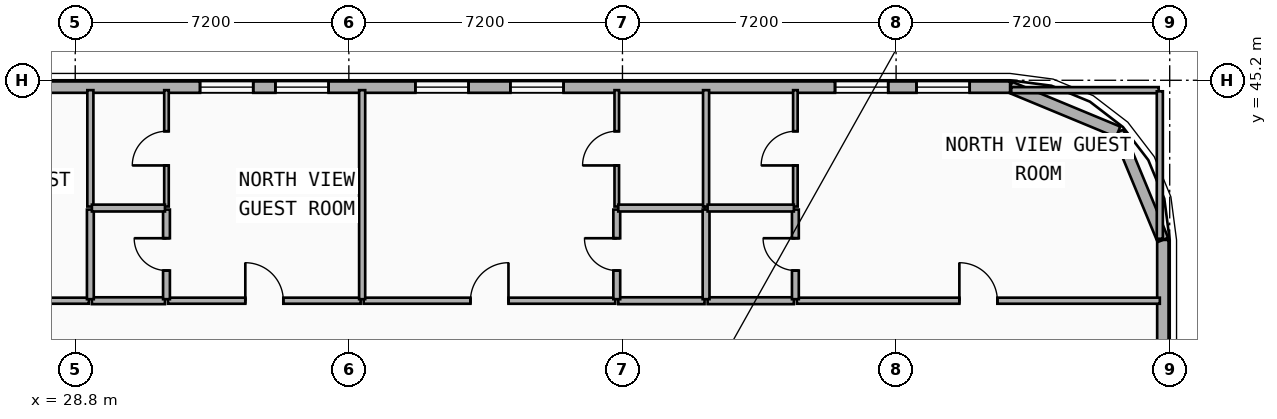
"""IFC4 building model, lengths in metres.
Left out: names, types, materials, properties, quantities, classifications, styles, units other than length and angle.
Written with IfcOpenShell. Run it as: python <this file> out.ifc"""

import sys

from ifc_helpers import new_model, si_unit, direction, frame, frame_2d, origin, place, context, subcontext, project, spatial, rectangle, extrude, element, fill, save


model = new_model("IFC4")
c1 = context("Model", 3, precision=1e-05, world=origin(), true_north=direction((0.0, 1.0)))
c2 = subcontext(c1, "Body", "Model", "MODEL_VIEW")
j1 = project(units=[si_unit("LENGTHUNIT", "METRE"), si_unit("PLANEANGLEUNIT", "RADIAN")], contexts=[c1])
p1 = place(None, origin())
s1 = spatial("IfcSite", under=j1, at=p1, CompositionType="ELEMENT")
p2 = place(p1, origin())
s2 = spatial("IfcBuilding", under=s1, at=p2, CompositionType="ELEMENT")
p3 = place(p2, frame((0.0, 0.0, 36.0)))
s3 = spatial("IfcBuildingStorey", under=s2, at=p3, CompositionType="ELEMENT", Elevation=36.0)
p4 = place(p3, frame((57.42, 41.0, 0.0), z_axis=(0.0, 0.0, 1.0), x_axis=(0.0, -1.0, 0.0)))
e1 = element("IfcWall", 1, at=p4, inside=s3, PredefinedType="SOLIDWALL", context=c2, shape_type="SweptSolid", body=[
    extrude(rectangle(XDim=15.2, YDim=0.3, at=frame_2d((7.6, 0.0))), origin(), (0.0, 0.0, 1.0), 3.24),
])
p5 = place(p4, frame((10.882, 0.0, 0.48)))
e2 = element("IfcOpeningElement", 2, at=p5, cuts=e1, PredefinedType="OPENING", context=c2, shape_type="SweptSolid", body=[
    extrude(rectangle(XDim=1.4, YDim=1.8, at=frame_2d((0.7, 0.9))), frame((0.0, 0.16, 0.0), z_axis=(0.0, -1.0, 0.0), x_axis=(1.0, 0.0, 0.0)), (0.0, 0.0, 1.0), 0.32),
])
p6 = place(p4, frame((5.621, 0.0, 0.48)))
e3 = element("IfcOpeningElement", 3, at=p6, cuts=e1, PredefinedType="OPENING", context=c2, shape_type="SweptSolid", body=[
    extrude(rectangle(XDim=1.4, YDim=1.8, at=frame_2d((0.7, 0.9))), frame((0.0, 0.16, 0.0), z_axis=(0.0, -1.0, 0.0), x_axis=(1.0, 0.0, 0.0)), (0.0, 0.0, 1.0), 0.32),
])
p7 = place(p3, frame((56.243, 43.843, 0.0), z_axis=(0.0, 0.0, 1.0), x_axis=(0.382636798336, -0.92389884758, 0.0)))
e4 = element("IfcWall", 4, at=p7, inside=s3, PredefinedType="SOLIDWALL", context=c2, shape_type="SweptSolid", body=[
    extrude(rectangle(XDim=3.077, YDim=0.3, at=frame_2d((1.538, 0.0))), origin(), (0.0, 0.0, 1.0), 3.24),
])
p8 = place(p3, frame((53.4, 45.02, 0.0), z_axis=(0.0, 0.0, 1.0), x_axis=(0.923882414032, -0.382676475685, 0.0)))
e5 = element("IfcWall", 5, at=p8, inside=s3, PredefinedType="SOLIDWALL", context=c2, shape_type="SweptSolid", body=[
    extrude(rectangle(XDim=3.077, YDim=0.3, at=frame_2d((1.539, 0.0))), origin(), (0.0, 0.0, 1.0), 3.24),
])
p9 = place(p3, frame((4.2, 45.02, 0.0), z_axis=(0.0, 0.0, 1.0), x_axis=(1.0, 0.0, 0.0)))
e6 = element("IfcWall", 6, at=p9, inside=s3, PredefinedType="SOLIDWALL", context=c2, shape_type="SweptSolid", body=[
    extrude(rectangle(XDim=49.2, YDim=0.3, at=frame_2d((24.6, 0.0))), origin(), (0.0, 0.0, 1.0), 3.24),
])
p10 = place(p9, frame((5.87, 0.0, 0.85)))
e7 = element("IfcOpeningElement", 7, at=p10, cuts=e6, PredefinedType="OPENING", context=c2, shape_type="SweptSolid", body=[
    extrude(rectangle(XDim=1.4, YDim=1.8, at=frame_2d((0.7, 0.9))), frame((0.0, 0.16, 0.0), z_axis=(0.0, -1.0, 0.0), x_axis=(1.0, 0.0, 0.0)), (0.0, 0.0, 1.0), 0.32),
])
p11 = place(p9, frame((8.481, 0.0, 0.85)))
e8 = element("IfcOpeningElement", 8, at=p11, cuts=e6, PredefinedType="OPENING", context=c2, shape_type="SweptSolid", body=[
    extrude(rectangle(XDim=1.4, YDim=1.8, at=frame_2d((0.7, 0.9))), frame((0.0, 0.16, 0.0), z_axis=(0.0, -1.0, 0.0), x_axis=(1.0, 0.0, 0.0)), (0.0, 0.0, 1.0), 0.32),
])
p12 = place(p9, frame((18.227, 0.0, 0.85)))
e9 = element("IfcOpeningElement", 9, at=p12, cuts=e6, PredefinedType="OPENING", context=c2, shape_type="SweptSolid", body=[
    extrude(rectangle(XDim=1.4, YDim=1.8, at=frame_2d((0.7, 0.9))), frame((0.0, 0.16, 0.0), z_axis=(0.0, -1.0, 0.0), x_axis=(1.0, 0.0, 0.0)), (0.0, 0.0, 1.0), 0.32),
])
p13 = place(p9, frame((21.462, 0.0, 0.85)))
e10 = element("IfcOpeningElement", 10, at=p13, cuts=e6, PredefinedType="OPENING", context=c2, shape_type="SweptSolid", body=[
    extrude(rectangle(XDim=1.4, YDim=1.8, at=frame_2d((0.7, 0.9))), frame((0.0, 0.16, 0.0), z_axis=(0.0, -1.0, 0.0), x_axis=(1.0, 0.0, 0.0)), (0.0, 0.0, 1.0), 0.32),
])
p14 = place(p9, frame((27.884, 0.0, 0.85)))
e11 = element("IfcOpeningElement", 11, at=p14, cuts=e6, PredefinedType="OPENING", context=c2, shape_type="SweptSolid", body=[
    extrude(rectangle(XDim=1.4, YDim=1.8, at=frame_2d((0.7, 0.9))), frame((0.0, 0.16, 0.0), z_axis=(0.0, -1.0, 0.0), x_axis=(1.0, 0.0, 0.0)), (0.0, 0.0, 1.0), 0.32),
])
p15 = place(p9, frame((29.867, 0.0, 0.85)))
e12 = element("IfcOpeningElement", 12, at=p15, cuts=e6, PredefinedType="OPENING", context=c2, shape_type="SweptSolid", body=[
    extrude(rectangle(XDim=1.4, YDim=1.8, at=frame_2d((0.7, 0.9))), frame((0.0, 0.16, 0.0), z_axis=(0.0, -1.0, 0.0), x_axis=(1.0, 0.0, 0.0)), (0.0, 0.0, 1.0), 0.32),
])
p16 = place(p9, frame((33.55, 0.0, 0.85)))
e13 = element("IfcOpeningElement", 13, at=p16, cuts=e6, PredefinedType="OPENING", context=c2, shape_type="SweptSolid", body=[
    extrude(rectangle(XDim=1.4, YDim=1.8, at=frame_2d((0.7, 0.9))), frame((0.0, 0.16, 0.0), z_axis=(0.0, -1.0, 0.0), x_axis=(1.0, 0.0, 0.0)), (0.0, 0.0, 1.0), 0.32),
])
p17 = place(p9, frame((36.05, 0.0, 0.85)))
e14 = element("IfcOpeningElement", 14, at=p17, cuts=e6, PredefinedType="OPENING", context=c2, shape_type="SweptSolid", body=[
    extrude(rectangle(XDim=1.4, YDim=1.8, at=frame_2d((0.7, 0.9))), frame((0.0, 0.16, 0.0), z_axis=(0.0, -1.0, 0.0), x_axis=(1.0, 0.0, 0.0)), (0.0, 0.0, 1.0), 0.32),
])
p18 = place(p9, frame((44.593, 0.0, 0.85)))
e15 = element("IfcOpeningElement", 15, at=p18, cuts=e6, PredefinedType="OPENING", context=c2, shape_type="SweptSolid", body=[
    extrude(rectangle(XDim=1.4, YDim=1.8, at=frame_2d((0.7, 0.9))), frame((0.0, 0.16, 0.0), z_axis=(0.0, -1.0, 0.0), x_axis=(1.0, 0.0, 0.0)), (0.0, 0.0, 1.0), 0.32),
])
p19 = place(p9, frame((46.737, 0.0, 0.85)))
e16 = element("IfcOpeningElement", 16, at=p19, cuts=e6, PredefinedType="OPENING", context=c2, shape_type="SweptSolid", body=[
    extrude(rectangle(XDim=1.4, YDim=1.8, at=frame_2d((0.7, 0.9))), frame((0.0, 0.16, 0.0), z_axis=(0.0, -1.0, 0.0), x_axis=(1.0, 0.0, 0.0)), (0.0, 0.0, 1.0), 0.32),
])
p20 = place(p3, frame((20.331, 39.4, 0.0), z_axis=(0.0, 0.0, 1.0), x_axis=(1.0, 0.0, 0.0)))
e17 = element("IfcWall", 17, at=p20, inside=s3, PredefinedType="PARTITIONING", context=c2, shape_type="SweptSolid", body=[
    extrude(rectangle(XDim=8.827, YDim=0.16, at=frame_2d((4.414, 0.0))), origin(), (0.0, 0.0, 1.0), 3.24),
])
p21 = place(p20, frame((3.914, 0.0, 0.0)))
e18 = element("IfcOpeningElement", 18, at=p21, cuts=e17, PredefinedType="OPENING", context=c2, shape_type="SweptSolid", body=[
    extrude(rectangle(XDim=1.0, YDim=2.15, at=frame_2d((0.5, 1.075))), frame((0.0, 0.09, 0.0), z_axis=(0.0, -1.0, 0.0), x_axis=(1.0, 0.0, 0.0)), (0.0, 0.0, 1.0), 0.18),
])
p22 = place(p3, frame((31.241, 39.4, 0.0), z_axis=(0.0, 0.0, 1.0), x_axis=(1.0, 0.0, 0.0)))
e19 = element("IfcWall", 19, at=p22, inside=s3, PredefinedType="PARTITIONING", context=c2, shape_type="SweptSolid", body=[
    extrude(rectangle(XDim=5.069, YDim=0.16, at=frame_2d((2.535, 0.0))), origin(), (0.0, 0.0, 1.0), 3.24),
])
p23 = place(p22, frame((2.034, 0.0, 0.0)))
e20 = element("IfcOpeningElement", 20, at=p23, cuts=e19, PredefinedType="OPENING", context=c2, shape_type="SweptSolid", body=[
    extrude(rectangle(XDim=1.0, YDim=2.15, at=frame_2d((0.5, 1.075))), frame((0.0, 0.09, 0.0), z_axis=(0.0, -1.0, 0.0), x_axis=(1.0, 0.0, 0.0)), (0.0, 0.0, 1.0), 0.18),
])
p24 = place(p3, frame((29.238, 39.4, 0.0), z_axis=(0.0, 0.0, 1.0), x_axis=(1.0, 0.0, 0.0)))
e21 = element("IfcWall", 21, at=p24, inside=s3, PredefinedType="PLUMBINGWALL", context=c2, shape_type="SweptSolid", body=[
    extrude(rectangle(XDim=1.923, YDim=0.18, at=frame_2d((0.961, 0.0))), origin(), (0.0, 0.0, 1.0), 3.24),
])
p25 = place(p3, frame((36.39, 39.4, 0.0), z_axis=(0.0, 0.0, 1.0), x_axis=(1.0, 0.0, 0.0)))
e22 = element("IfcWall", 22, at=p25, inside=s3, PredefinedType="PARTITIONING", context=c2, shape_type="SweptSolid", body=[
    extrude(rectangle(XDim=6.62, YDim=0.16, at=frame_2d((3.31, 0.0))), origin(), (0.0, 0.0, 1.0), 3.24),
])
p26 = place(p25, frame((2.81, 0.0, 0.0)))
e23 = element("IfcOpeningElement", 23, at=p26, cuts=e22, PredefinedType="OPENING", context=c2, shape_type="SweptSolid", body=[
    extrude(rectangle(XDim=1.0, YDim=2.15, at=frame_2d((0.5, 1.075))), frame((0.0, 0.09, 0.0), z_axis=(0.0, -1.0, 0.0), x_axis=(1.0, 0.0, 0.0)), (0.0, 0.0, 1.0), 0.18),
])
p27 = place(p3, frame((43.09, 39.4, 0.0), z_axis=(0.0, 0.0, 1.0), x_axis=(1.0, 0.0, 0.0)))
e24 = element("IfcWall", 24, at=p27, inside=s3, PredefinedType="PLUMBINGWALL", context=c2, shape_type="SweptSolid", body=[
    extrude(rectangle(XDim=2.27, YDim=0.18, at=frame_2d((1.135, 0.0))), origin(), (0.0, 0.0, 1.0), 3.24),
])
p28 = place(p3, frame((47.79, 39.4, 0.0), z_axis=(0.0, 0.0, 1.0), x_axis=(1.0, 0.0, 0.0)))
e25 = element("IfcWall", 25, at=p28, inside=s3, PredefinedType="PARTITIONING", context=c2, shape_type="SweptSolid", body=[
    extrude(rectangle(XDim=9.55, YDim=0.16, at=frame_2d((4.775, 0.0))), origin(), (0.0, 0.0, 1.0), 3.24),
])
p29 = place(p28, frame((4.275, 0.0, 0.0)))
e26 = element("IfcOpeningElement", 26, at=p29, cuts=e25, PredefinedType="OPENING", context=c2, shape_type="SweptSolid", body=[
    extrude(rectangle(XDim=1.0, YDim=2.15, at=frame_2d((0.5, 1.075))), frame((0.0, 0.09, 0.0), z_axis=(0.0, -1.0, 0.0), x_axis=(1.0, 0.0, 0.0)), (0.0, 0.0, 1.0), 0.18),
])
p30 = place(p3, frame((45.44, 39.4, 0.0), z_axis=(0.0, 0.0, 1.0), x_axis=(1.0, 0.0, 0.0)))
e27 = element("IfcWall", 27, at=p30, inside=s3, PredefinedType="PLUMBINGWALL", context=c2, shape_type="SweptSolid", body=[
    extrude(rectangle(XDim=2.27, YDim=0.18, at=frame_2d((1.135, 0.0))), origin(), (0.0, 0.0, 1.0), 3.24),
])
p31 = place(p3, frame((29.198, 39.44, 0.0), z_axis=(0.0, 0.0, 1.0), x_axis=(0.0, 1.0, 0.0)))
e28 = element("IfcWall", 28, at=p31, inside=s3, PredefinedType="PLUMBINGWALL", context=c2, shape_type="SweptSolid", body=[
    extrude(rectangle(XDim=2.358, YDim=0.18, at=frame_2d((1.179, 0.0))), origin(), (0.0, 0.0, 1.0), 3.24),
])
p32 = place(p3, frame((29.198, 41.878, 0.0), z_axis=(0.0, 0.0, 1.0), x_axis=(0.0, 1.0, 0.0)))
e29 = element("IfcWall", 29, at=p32, inside=s3, PredefinedType="PARTITIONING", context=c2, shape_type="SweptSolid", body=[
    extrude(rectangle(XDim=3.062, YDim=0.16, at=frame_2d((1.531, 0.0))), origin(), (0.0, 0.0, 1.0), 3.24),
])
p33 = place(p3, frame((31.201, 39.44, 0.0), z_axis=(0.0, 0.0, 1.0), x_axis=(0.0, 1.0, 0.0)))
e30 = element("IfcWall", 30, at=p33, inside=s3, PredefinedType="PLUMBINGWALL", context=c2, shape_type="SweptSolid", body=[
    extrude(rectangle(XDim=2.358, YDim=0.18, at=frame_2d((1.179, 0.0))), origin(), (0.0, 0.0, 1.0), 3.24),
])
p34 = place(p33, frame((0.754, 0.0, 0.0)))
e31 = element("IfcOpeningElement", 31, at=p34, cuts=e30, PredefinedType="OPENING", context=c2, shape_type="SweptSolid", body=[
    extrude(rectangle(XDim=0.85, YDim=2.1, at=frame_2d((0.425, 1.05))), frame((0.0, 0.1, 0.0), z_axis=(0.0, -1.0, 0.0), x_axis=(1.0, 0.0, 0.0)), (0.0, 0.0, 1.0), 0.2),
])
p35 = place(p3, frame((31.201, 41.878, 0.0), z_axis=(0.0, 0.0, 1.0), x_axis=(0.0, 1.0, 0.0)))
e32 = element("IfcWall", 32, at=p35, inside=s3, PredefinedType="PARTITIONING", context=c2, shape_type="SweptSolid", body=[
    extrude(rectangle(XDim=3.062, YDim=0.12, at=frame_2d((1.531, 0.0))), origin(), (0.0, 0.0, 1.0), 3.24),
])
p36 = place(p35, frame((1.081, 0.0, 0.0)))
e33 = element("IfcOpeningElement", 33, at=p36, cuts=e32, PredefinedType="OPENING", context=c2, shape_type="SweptSolid", body=[
    extrude(rectangle(XDim=0.9, YDim=2.1, at=frame_2d((0.45, 1.05))), frame((0.0, 0.07, 0.0), z_axis=(0.0, -1.0, 0.0), x_axis=(1.0, 0.0, 0.0)), (0.0, 0.0, 1.0), 0.14),
])
p37 = place(p3, frame((36.35, 39.44, 0.0), z_axis=(0.0, 0.0, 1.0), x_axis=(0.0, 1.0, 0.0)))
e34 = element("IfcWall", 34, at=p37, inside=s3, PredefinedType="PARTITIONING", context=c2, shape_type="SweptSolid", body=[
    extrude(rectangle(XDim=5.5, YDim=0.16, at=frame_2d((2.75, 0.0))), origin(), (0.0, 0.0, 1.0), 3.24),
])
p38 = place(p3, frame((29.238, 41.838, 0.0), z_axis=(0.0, 0.0, 1.0), x_axis=(1.0, 0.0, 0.0)))
e35 = element("IfcWall", 35, at=p38, inside=s3, PredefinedType="PLUMBINGWALL", context=c2, shape_type="SweptSolid", body=[
    extrude(rectangle(XDim=1.923, YDim=0.18, at=frame_2d((0.961, 0.0))), origin(), (0.0, 0.0, 1.0), 3.24),
])
p39 = place(p3, frame((43.05, 39.44, 0.0), z_axis=(0.0, 0.0, 1.0), x_axis=(0.0, 1.0, 0.0)))
e36 = element("IfcWall", 36, at=p39, inside=s3, PredefinedType="PLUMBINGWALL", context=c2, shape_type="SweptSolid", body=[
    extrude(rectangle(XDim=2.358, YDim=0.18, at=frame_2d((1.179, 0.0))), origin(), (0.0, 0.0, 1.0), 3.24),
])
p40 = place(p39, frame((0.754, 0.0, 0.0)))
e37 = element("IfcOpeningElement", 37, at=p40, cuts=e36, PredefinedType="OPENING", context=c2, shape_type="SweptSolid", body=[
    extrude(rectangle(XDim=0.85, YDim=2.1, at=frame_2d((0.425, 1.05))), frame((0.0, 0.1, 0.0), z_axis=(0.0, -1.0, 0.0), x_axis=(1.0, 0.0, 0.0)), (0.0, 0.0, 1.0), 0.2),
])
p41 = place(p3, frame((43.05, 41.878, 0.0), z_axis=(0.0, 0.0, 1.0), x_axis=(0.0, 1.0, 0.0)))
e38 = element("IfcWall", 38, at=p41, inside=s3, PredefinedType="PARTITIONING", context=c2, shape_type="SweptSolid", body=[
    extrude(rectangle(XDim=3.062, YDim=0.12, at=frame_2d((1.531, 0.0))), origin(), (0.0, 0.0, 1.0), 3.24),
])
p42 = place(p41, frame((1.081, 0.0, 0.0)))
e39 = element("IfcOpeningElement", 39, at=p42, cuts=e38, PredefinedType="OPENING", context=c2, shape_type="SweptSolid", body=[
    extrude(rectangle(XDim=0.9, YDim=2.1, at=frame_2d((0.45, 1.05))), frame((0.0, 0.07, 0.0), z_axis=(0.0, -1.0, 0.0), x_axis=(1.0, 0.0, 0.0)), (0.0, 0.0, 1.0), 0.14),
])
p43 = place(p3, frame((43.09, 41.838, 0.0), z_axis=(0.0, 0.0, 1.0), x_axis=(1.0, 0.0, 0.0)))
e40 = element("IfcWall", 40, at=p43, inside=s3, PredefinedType="PLUMBINGWALL", context=c2, shape_type="SweptSolid", body=[
    extrude(rectangle(XDim=2.27, YDim=0.18, at=frame_2d((1.135, 0.0))), origin(), (0.0, 0.0, 1.0), 3.24),
])
p44 = place(p3, frame((45.4, 39.44, 0.0), z_axis=(0.0, 0.0, 1.0), x_axis=(0.0, 1.0, 0.0)))
e41 = element("IfcWall", 41, at=p44, inside=s3, PredefinedType="PLUMBINGWALL", context=c2, shape_type="SweptSolid", body=[
    extrude(rectangle(XDim=2.358, YDim=0.18, at=frame_2d((1.179, 0.0))), origin(), (0.0, 0.0, 1.0), 3.24),
])
p45 = place(p3, frame((45.4, 41.878, 0.0), z_axis=(0.0, 0.0, 1.0), x_axis=(0.0, 1.0, 0.0)))
e42 = element("IfcWall", 42, at=p45, inside=s3, PredefinedType="PARTITIONING", context=c2, shape_type="SweptSolid", body=[
    extrude(rectangle(XDim=3.062, YDim=0.16, at=frame_2d((1.531, 0.0))), origin(), (0.0, 0.0, 1.0), 3.24),
])
p46 = place(p3, frame((47.75, 39.44, 0.0), z_axis=(0.0, 0.0, 1.0), x_axis=(0.0, 1.0, 0.0)))
e43 = element("IfcWall", 43, at=p46, inside=s3, PredefinedType="PLUMBINGWALL", context=c2, shape_type="SweptSolid", body=[
    extrude(rectangle(XDim=2.358, YDim=0.18, at=frame_2d((1.179, 0.0))), origin(), (0.0, 0.0, 1.0), 3.24),
])
p47 = place(p46, frame((0.754, 0.0, 0.0)))
e44 = element("IfcOpeningElement", 44, at=p47, cuts=e43, PredefinedType="OPENING", context=c2, shape_type="SweptSolid", body=[
    extrude(rectangle(XDim=0.85, YDim=2.1, at=frame_2d((0.425, 1.05))), frame((0.0, 0.1, 0.0), z_axis=(0.0, -1.0, 0.0), x_axis=(1.0, 0.0, 0.0)), (0.0, 0.0, 1.0), 0.2),
])
p48 = place(p3, frame((47.75, 41.878, 0.0), z_axis=(0.0, 0.0, 1.0), x_axis=(0.0, 1.0, 0.0)))
e45 = element("IfcWall", 45, at=p48, inside=s3, PredefinedType="PARTITIONING", context=c2, shape_type="SweptSolid", body=[
    extrude(rectangle(XDim=3.062, YDim=0.12, at=frame_2d((1.531, 0.0))), origin(), (0.0, 0.0, 1.0), 3.24),
])
p49 = place(p48, frame((1.081, 0.0, 0.0)))
e46 = element("IfcOpeningElement", 46, at=p49, cuts=e45, PredefinedType="OPENING", context=c2, shape_type="SweptSolid", body=[
    extrude(rectangle(XDim=0.9, YDim=2.1, at=frame_2d((0.45, 1.05))), frame((0.0, 0.07, 0.0), z_axis=(0.0, -1.0, 0.0), x_axis=(1.0, 0.0, 0.0)), (0.0, 0.0, 1.0), 0.14),
])
p50 = place(p3, frame((45.44, 41.838, 0.0), z_axis=(0.0, 0.0, 1.0), x_axis=(1.0, 0.0, 0.0)))
e47 = element("IfcWall", 47, at=p50, inside=s3, PredefinedType="PLUMBINGWALL", context=c2, shape_type="SweptSolid", body=[
    extrude(rectangle(XDim=2.27, YDim=0.18, at=frame_2d((1.135, 0.0))), origin(), (0.0, 0.0, 1.0), 3.24),
])
p51 = place(p3, frame((53.43, 44.94, 0.0), z_axis=(0.0, 0.0, 1.0), x_axis=(1.0, 0.0, 0.0)))
e48 = element("IfcWall", 48, at=p51, inside=s3, PredefinedType="PARTITIONING", context=c2, shape_type="SweptSolid", body=[
    extrude(rectangle(XDim=3.88, YDim=0.16, at=frame_2d((1.94, 0.0))), origin(), (0.0, 0.0, 1.0), 3.24),
])
p52 = place(p3, frame((57.34, 41.03, 0.0), z_axis=(0.0, 0.0, 1.0), x_axis=(0.0, 1.0, 0.0)))
e49 = element("IfcWall", 49, at=p52, inside=s3, PredefinedType="PARTITIONING", context=c2, shape_type="SweptSolid", body=[
    extrude(rectangle(XDim=3.88, YDim=0.16, at=frame_2d((1.94, 0.0))), origin(), (0.0, 0.0, 1.0), 3.24),
])
p53 = place(p14, origin())
e50 = element("IfcWindow", 50, at=p53, inside=s3, PartitioningType="SINGLE_PANEL", PredefinedType="WINDOW", context=c2, shape_type="SweptSolid", body=[
    extrude(rectangle(XDim=1.4, YDim=1.8, at=frame_2d((0.7, 0.9))), frame((0.0, 0.03, 0.0), z_axis=(0.0, -1.0, 0.0), x_axis=(1.0, 0.0, 0.0)), (0.0, 0.0, 1.0), 0.06),
])
fill(e11, e50)
p54 = place(p15, origin())
e51 = element("IfcWindow", 51, at=p54, inside=s3, PartitioningType="SINGLE_PANEL", PredefinedType="WINDOW", context=c2, shape_type="SweptSolid", body=[
    extrude(rectangle(XDim=1.4, YDim=1.8, at=frame_2d((0.7, 0.9))), frame((0.0, 0.03, 0.0), z_axis=(0.0, -1.0, 0.0), x_axis=(1.0, 0.0, 0.0)), (0.0, 0.0, 1.0), 0.06),
])
fill(e12, e51)
p55 = place(p16, origin())
e52 = element("IfcWindow", 52, at=p55, inside=s3, PartitioningType="SINGLE_PANEL", PredefinedType="WINDOW", context=c2, shape_type="SweptSolid", body=[
    extrude(rectangle(XDim=1.4, YDim=1.8, at=frame_2d((0.7, 0.9))), frame((0.0, 0.03, 0.0), z_axis=(0.0, -1.0, 0.0), x_axis=(1.0, 0.0, 0.0)), (0.0, 0.0, 1.0), 0.06),
])
fill(e13, e52)
p56 = place(p17, origin())
e53 = element("IfcWindow", 53, at=p56, inside=s3, PartitioningType="SINGLE_PANEL", PredefinedType="WINDOW", context=c2, shape_type="SweptSolid", body=[
    extrude(rectangle(XDim=1.4, YDim=1.8, at=frame_2d((0.7, 0.9))), frame((0.0, 0.03, 0.0), z_axis=(0.0, -1.0, 0.0), x_axis=(1.0, 0.0, 0.0)), (0.0, 0.0, 1.0), 0.06),
])
fill(e14, e53)
p57 = place(p18, origin())
e54 = element("IfcWindow", 54, at=p57, inside=s3, PartitioningType="SINGLE_PANEL", PredefinedType="WINDOW", context=c2, shape_type="SweptSolid", body=[
    extrude(rectangle(XDim=1.4, YDim=1.8, at=frame_2d((0.7, 0.9))), frame((0.0, 0.03, 0.0), z_axis=(0.0, -1.0, 0.0), x_axis=(1.0, 0.0, 0.0)), (0.0, 0.0, 1.0), 0.06),
])
fill(e15, e54)
p58 = place(p19, origin())
e55 = element("IfcWindow", 55, at=p58, inside=s3, PartitioningType="SINGLE_PANEL", PredefinedType="WINDOW", context=c2, shape_type="SweptSolid", body=[
    extrude(rectangle(XDim=1.4, YDim=1.8, at=frame_2d((0.7, 0.9))), frame((0.0, 0.03, 0.0), z_axis=(0.0, -1.0, 0.0), x_axis=(1.0, 0.0, 0.0)), (0.0, 0.0, 1.0), 0.06),
])
fill(e16, e55)
p59 = place(p23, origin())
e56 = element("IfcDoor", 56, at=p59, inside=s3, OperationType="SINGLE_SWING_LEFT", PredefinedType="DOOR", context=c2, shape_type="SweptSolid", body=[
    extrude(rectangle(XDim=1.0, YDim=2.15, at=frame_2d((0.5, 1.075))), frame((0.0, 0.025, 0.0), z_axis=(0.0, -1.0, 0.0), x_axis=(1.0, 0.0, 0.0)), (0.0, 0.0, 1.0), 0.05),
])
fill(e20, e56)
p60 = place(p26, origin())
e57 = element("IfcDoor", 57, at=p60, inside=s3, OperationType="SINGLE_SWING_RIGHT", PredefinedType="DOOR", context=c2, shape_type="SweptSolid", body=[
    extrude(rectangle(XDim=1.0, YDim=2.15, at=frame_2d((0.5, 1.075))), frame((0.0, 0.025, 0.0), z_axis=(0.0, -1.0, 0.0), x_axis=(1.0, 0.0, 0.0)), (0.0, 0.0, 1.0), 0.05),
])
fill(e23, e57)
p61 = place(p29, origin())
e58 = element("IfcDoor", 58, at=p61, inside=s3, OperationType="SINGLE_SWING_LEFT", PredefinedType="DOOR", context=c2, shape_type="SweptSolid", body=[
    extrude(rectangle(XDim=1.0, YDim=2.15, at=frame_2d((0.5, 1.075))), frame((0.0, 0.025, 0.0), z_axis=(0.0, -1.0, 0.0), x_axis=(1.0, 0.0, 0.0)), (0.0, 0.0, 1.0), 0.05),
])
fill(e26, e58)
p62 = place(p34, origin())
e59 = element("IfcDoor", 59, at=p62, inside=s3, OperationType="SINGLE_SWING_RIGHT", PredefinedType="DOOR", context=c2, shape_type="SweptSolid", body=[
    extrude(rectangle(XDim=0.85, YDim=2.1, at=frame_2d((0.425, 1.05))), frame((0.0, 0.025, 0.0), z_axis=(0.0, -1.0, 0.0), x_axis=(1.0, 0.0, 0.0)), (0.0, 0.0, 1.0), 0.05),
])
fill(e31, e59)
p63 = place(p36, origin())
e60 = element("IfcDoor", 60, at=p63, inside=s3, OperationType="SINGLE_SWING_LEFT", PredefinedType="DOOR", context=c2, shape_type="SweptSolid", body=[
    extrude(rectangle(XDim=0.9, YDim=2.1, at=frame_2d((0.45, 1.05))), frame((0.0, 0.025, 0.0), z_axis=(0.0, -1.0, 0.0), x_axis=(1.0, 0.0, 0.0)), (0.0, 0.0, 1.0), 0.05),
])
fill(e33, e60)
p64 = place(p40, origin())
e61 = element("IfcDoor", 61, at=p64, inside=s3, OperationType="SINGLE_SWING_RIGHT", PredefinedType="DOOR", context=c2, shape_type="SweptSolid", body=[
    extrude(rectangle(XDim=0.85, YDim=2.1, at=frame_2d((0.425, 1.05))), frame((0.0, 0.025, 0.0), z_axis=(0.0, -1.0, 0.0), x_axis=(1.0, 0.0, 0.0)), (0.0, 0.0, 1.0), 0.05),
])
fill(e37, e61)
p65 = place(p42, origin())
e62 = element("IfcDoor", 62, at=p65, inside=s3, OperationType="SINGLE_SWING_LEFT", PredefinedType="DOOR", context=c2, shape_type="SweptSolid", body=[
    extrude(rectangle(XDim=0.9, YDim=2.1, at=frame_2d((0.45, 1.05))), frame((0.0, 0.025, 0.0), z_axis=(0.0, -1.0, 0.0), x_axis=(1.0, 0.0, 0.0)), (0.0, 0.0, 1.0), 0.05),
])
fill(e39, e62)
p66 = place(p47, origin())
e63 = element("IfcDoor", 63, at=p66, inside=s3, OperationType="SINGLE_SWING_RIGHT", PredefinedType="DOOR", context=c2, shape_type="SweptSolid", body=[
    extrude(rectangle(XDim=0.85, YDim=2.1, at=frame_2d((0.425, 1.05))), frame((0.0, 0.025, 0.0), z_axis=(0.0, -1.0, 0.0), x_axis=(1.0, 0.0, 0.0)), (0.0, 0.0, 1.0), 0.05),
])
fill(e44, e63)
p67 = place(p49, origin())
e64 = element("IfcDoor", 64, at=p67, inside=s3, OperationType="SINGLE_SWING_LEFT", PredefinedType="DOOR", context=c2, shape_type="SweptSolid", body=[
    extrude(rectangle(XDim=0.9, YDim=2.1, at=frame_2d((0.45, 1.05))), frame((0.0, 0.025, 0.0), z_axis=(0.0, -1.0, 0.0), x_axis=(1.0, 0.0, 0.0)), (0.0, 0.0, 1.0), 0.05),
])
fill(e46, e64)
save(model, sys.argv[1])
